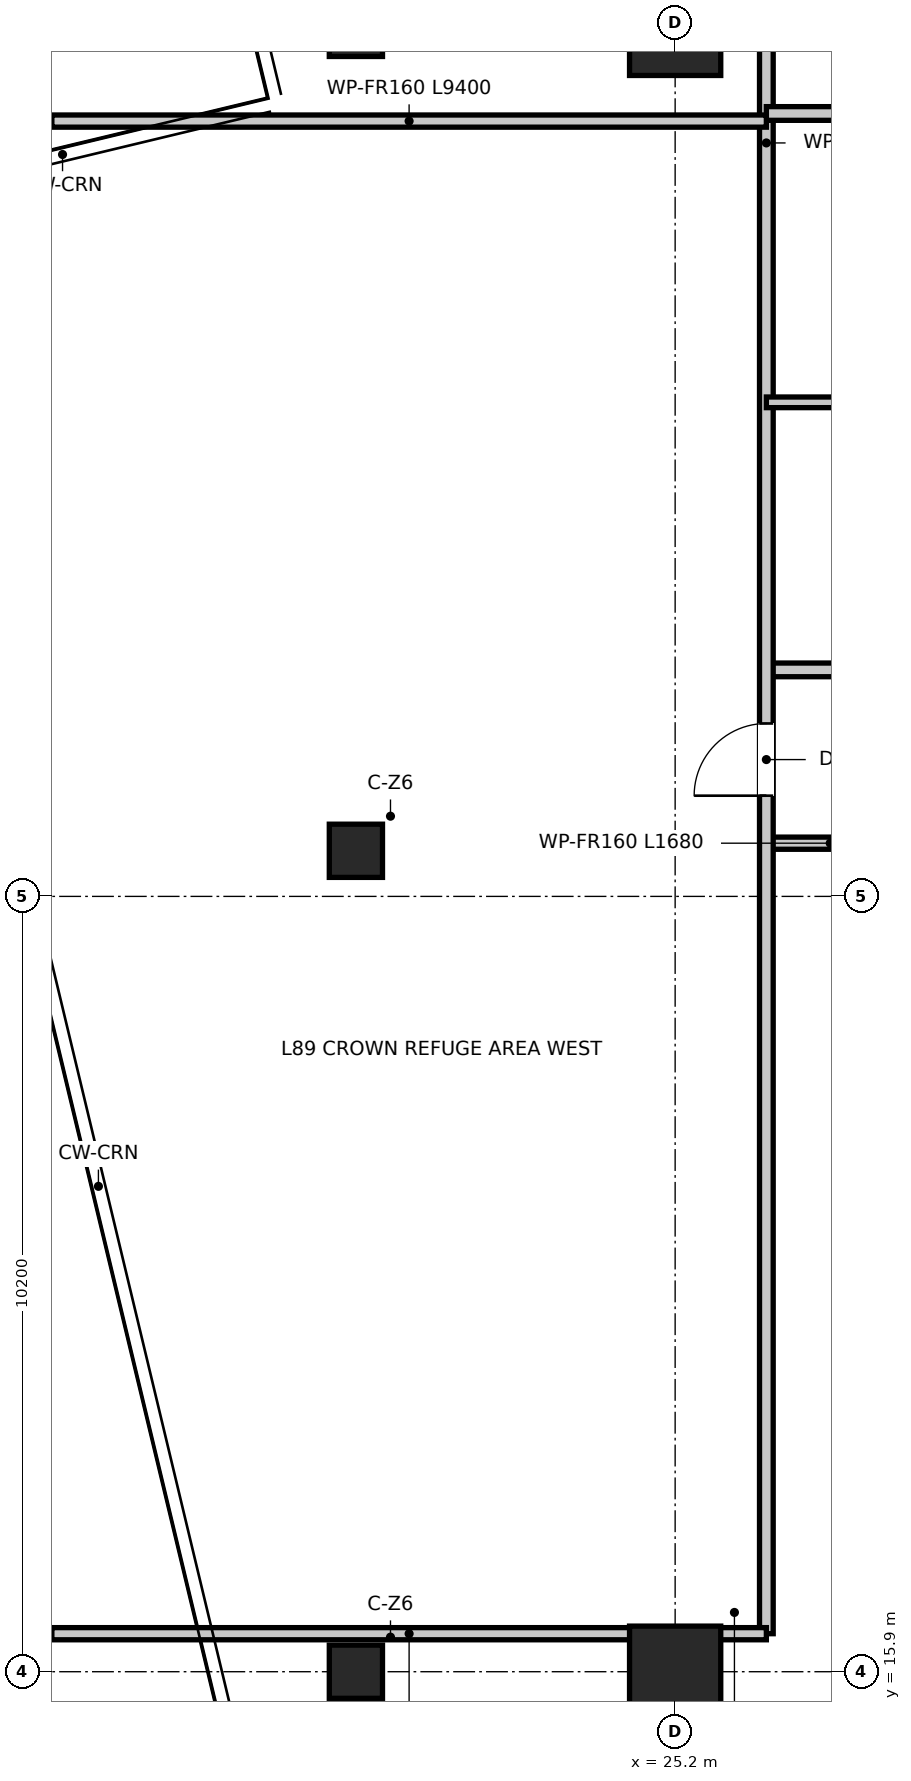
"""IFC4 building model, lengths in metres.
Left out: names, types, materials, properties, quantities, classifications, styles, units other than length and angle.
Written with IfcOpenShell. Run it as: python <this file> out.ifc"""

import sys

from ifc_helpers import new_model, si_unit, direction, frame, frame_2d, origin, origin_2d, place, context, subcontext, project, spatial, rectangle, extrude, source, transform, mapped, element, fill, save


model = new_model("IFC4")
c1 = context("Model", 3, precision=1e-05, world=origin(), true_north=direction((0.0, 1.0)))
c2 = subcontext(c1, "Body", "Model", "MODEL_VIEW")
j1 = project(units=[si_unit("LENGTHUNIT", "METRE"), si_unit("PLANEANGLEUNIT", "RADIAN")], contexts=[c1])
p1 = place(None, origin())
s1 = spatial("IfcSite", under=j1, at=p1, CompositionType="ELEMENT")
p2 = place(p1, origin())
s2 = spatial("IfcBuilding", under=s1, at=p2, CompositionType="ELEMENT")
p3 = place(p2, frame((0.0, 0.0, 363.25)))
s3 = spatial("IfcBuildingStorey", under=s2, at=p3, CompositionType="ELEMENT", Elevation=363.25)
m1 = source(origin(), c2, "Body", "SweptSolid", [
    extrude(rectangle(XDim=1.2, YDim=1.2, at=origin_2d()), origin(), (0.0, 0.0, 1.0), 3.8),
])
for number, where, z_axis, x_axis in (
    (1, (25.2, 15.9, 0.0), (0.0, 0.0, 1.0), (1.0, 0.0, 0.0)),
    (2, (25.2, 37.5, 0.0), (0.0, 0.0, 1.0), (1.0, 0.0, 0.0)),
):
    element("IfcColumn", number, at=place(p3, frame(where, z_axis=z_axis, x_axis=x_axis)), inside=s3, PredefinedType="USERDEFINED", context=c2, shape_type="MappedRepresentation", body=[
        mapped(m1, transform((0.0, 0.0, 0.0), x_axis=(1.0, 0.0, 0.0), y_axis=(0.0, 1.0, 0.0), z_axis=(0.0, 0.0, 1.0), scale=1.0)),
    ])
m2 = source(origin(), c2, "Body", "SweptSolid", [
    extrude(rectangle(XDim=0.7, YDim=0.7, at=origin_2d()), origin(), (0.0, 0.0, 1.0), 3.8),
])
for number, where, z_axis, x_axis in (
    (3, (21.0, 15.9, 0.0), (0.0, 0.0, 1.0), (1.0, 0.0, 0.0)),
    (4, (21.0, 26.7, 0.0), (0.0, 0.0, 1.0), (1.0, 0.0, 0.0)),
    (5, (21.0, 37.5, 0.0), (0.0, 0.0, 1.0), (1.0, 0.0, 0.0)),
):
    element("IfcColumn", number, at=place(p3, frame(where, z_axis=z_axis, x_axis=x_axis)), inside=s3, PredefinedType="COLUMN", context=c2, shape_type="MappedRepresentation", body=[
        mapped(m2, transform((0.0, 0.0, 0.0), x_axis=(1.0, 0.0, 0.0), y_axis=(0.0, 1.0, 0.0), z_axis=(0.0, 0.0, 1.0), scale=1.0)),
    ])
p4 = place(p3, frame((26.4, 26.8, 0.0), z_axis=(0.0, 0.0, 1.0), x_axis=(1.0, 0.0, 0.0)))
e6 = element("IfcWall", 6, at=p4, inside=s3, PredefinedType="PARTITIONING", context=c2, shape_type="SweptSolid", body=[
    extrude(rectangle(XDim=1.68, YDim=0.16, at=frame_2d((0.84, 0.0))), origin(), (0.0, 0.0, 1.0), 3.5),
])
p5 = place(p3, frame((26.4, 29.08, 0.0), z_axis=(0.0, 0.0, 1.0), x_axis=(1.0, 0.0, 0.0)))
e7 = element("IfcWall", 7, at=p5, inside=s3, PredefinedType="PARTITIONING", context=c2, shape_type="SweptSolid", body=[
    extrude(rectangle(XDim=8.52, YDim=0.18, at=frame_2d((4.26, 0.0))), origin(), (0.0, 0.0, 1.0), 2.8),
])
p6 = place(p5, frame((1.575, 0.0, 0.0)))
e8 = element("IfcOpeningElement", 8, at=p6, cuts=e7, PredefinedType="OPENING", context=c2, shape_type="SweptSolid", body=[
    extrude(rectangle(XDim=1.05, YDim=2.1, at=frame_2d((0.525, 1.05))), frame((0.0, 0.1, 0.0), z_axis=(0.0, -1.0, 0.0), x_axis=(1.0, 0.0, 0.0)), (0.0, 0.0, 1.0), 0.2),
])
p7 = place(p3, frame((26.4, 16.4, 0.0), z_axis=(0.0, 0.0, 1.0), x_axis=(0.0, 1.0, 0.0)))
e9 = element("IfcWall", 9, at=p7, inside=s3, PredefinedType="PARTITIONING", context=c2, shape_type="SweptSolid", body=[
    extrude(rectangle(XDim=27.1, YDim=0.18, at=frame_2d((13.55, 0.0))), origin(), (0.0, 0.0, 1.0), 2.8),
])
p8 = place(p7, frame((11.025, 0.0, 0.0)))
e10 = element("IfcOpeningElement", 10, at=p8, cuts=e9, PredefinedType="OPENING", context=c2, shape_type="SweptSolid", body=[
    extrude(rectangle(XDim=0.95, YDim=2.1, at=frame_2d((0.475, 1.05))), frame((0.0, 0.1, 0.0), z_axis=(0.0, -1.0, 0.0), x_axis=(1.0, 0.0, 0.0)), (0.0, 0.0, 1.0), 0.2),
])
p9 = place(p3, frame((26.4, 36.4, 0.0), z_axis=(0.0, 0.0, 1.0), x_axis=(1.0, 0.0, 0.0)))
e11 = element("IfcWall", 11, at=p9, inside=s3, PredefinedType="PARTITIONING", context=c2, shape_type="SweptSolid", body=[
    extrude(rectangle(XDim=19.2, YDim=0.18, at=frame_2d((9.6, 0.0))), origin(), (0.0, 0.0, 1.0), 2.8),
])
p10 = place(p9, frame((9.075, 0.0, 0.0)))
e12 = element("IfcOpeningElement", 12, at=p10, cuts=e11, PredefinedType="OPENING", context=c2, shape_type="SweptSolid", body=[
    extrude(rectangle(XDim=1.05, YDim=2.1, at=frame_2d((0.525, 1.05))), frame((0.0, 0.1, 0.0), z_axis=(0.0, -1.0, 0.0), x_axis=(1.0, 0.0, 0.0)), (0.0, 0.0, 1.0), 0.2),
])
p11 = place(p3, frame((26.4, 32.6, 0.0), z_axis=(0.0, 0.0, 1.0), x_axis=(1.0, 0.0, 0.0)))
e13 = element("IfcWall", 13, at=p11, inside=s3, PredefinedType="PARTITIONING", context=c2, shape_type="SweptSolid", body=[
    extrude(rectangle(XDim=8.52, YDim=0.14, at=frame_2d((4.26, 0.0))), origin(), (0.0, 0.0, 1.0), 2.8),
])
p12 = place(p11, frame((1.625, 0.0, 0.0)))
e14 = element("IfcOpeningElement", 14, at=p12, cuts=e13, PredefinedType="OPENING", context=c2, shape_type="SweptSolid", body=[
    extrude(rectangle(XDim=0.95, YDim=2.1, at=frame_2d((0.475, 1.05))), frame((0.0, 0.08, 0.0), z_axis=(0.0, -1.0, 0.0), x_axis=(1.0, 0.0, 0.0)), (0.0, 0.0, 1.0), 0.16),
])
for number, where, z_axis, x_axis in (
    (15, (17.0, 16.4, 0.0), (0.0, 0.0, 1.0), (1.0, 0.0, 0.0)),
    (16, (17.0, 36.3, 0.0), (0.0, 0.0, 1.0), (1.0, 0.0, 0.0)),
):
    element("IfcWall", number, at=place(p3, frame(where, z_axis=z_axis, x_axis=x_axis)), inside=s3, PredefinedType="PARTITIONING", context=c2, shape_type="SweptSolid", body=[
        extrude(rectangle(XDim=9.4, YDim=0.16, at=frame_2d((4.7, 0.0))), origin(), (0.0, 0.0, 1.0), 2.8),
    ])
p13 = place(p8, origin())
e17 = element("IfcDoor", 17, at=p13, inside=s3, OperationType="SINGLE_SWING_LEFT", PredefinedType="DOOR", context=c2, shape_type="SweptSolid", body=[
    extrude(rectangle(XDim=0.95, YDim=2.1, at=frame_2d((0.475, 1.05))), frame((0.0, 0.025, 0.0), z_axis=(0.0, -1.0, 0.0), x_axis=(1.0, 0.0, 0.0)), (0.0, 0.0, 1.0), 0.05),
])
fill(e10, e17)
save(model, sys.argv[1])
